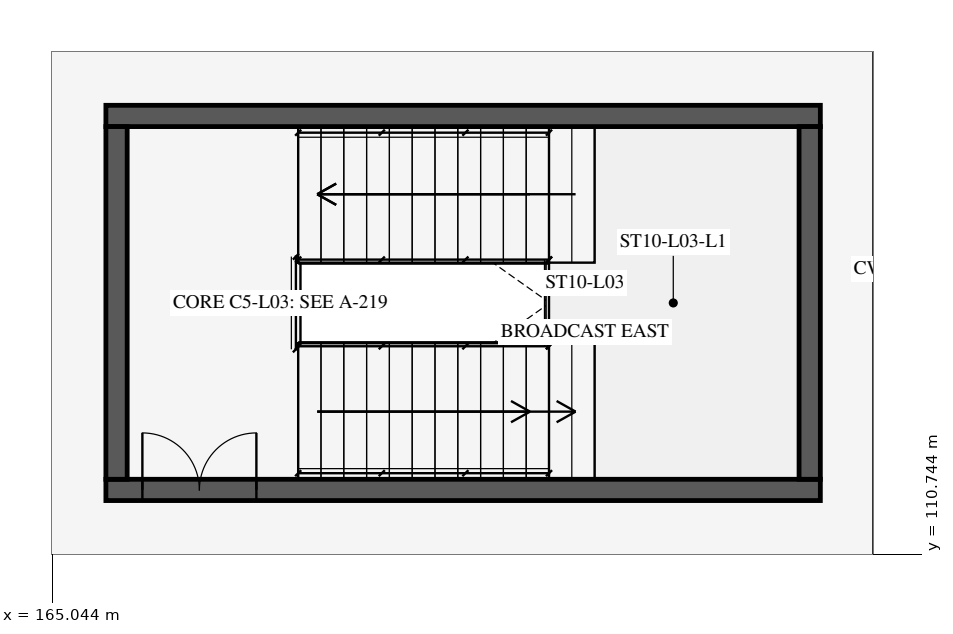
"""IFC4 building model, lengths in metres.
Left out: names, types, materials, properties, quantities, classifications, styles, units other than length and angle.
Written with IfcOpenShell. Run it as: python <this file> out.ifc"""

import sys

from ifc_helpers import new_model, si_unit, direction, frame, frame_2d, origin, place, context, subcontext, project, spatial, rectangle, extrude, element, fill, save


model = new_model("IFC4")
c1 = context("Model", 3, precision=1e-05, world=origin(), true_north=direction((0.0, 1.0)))
c2 = subcontext(c1, "Body", "Model", "MODEL_VIEW")
j1 = project(units=[si_unit("LENGTHUNIT", "METRE"), si_unit("PLANEANGLEUNIT", "RADIAN")], contexts=[c1])
p1 = place(None, origin())
s1 = spatial("IfcSite", under=j1, at=p1, CompositionType="ELEMENT")
p2 = place(p1, origin())
s2 = spatial("IfcBuilding", under=s1, at=p2, CompositionType="ELEMENT")
p3 = place(p2, frame((0.0, 0.0, 14.8)))
s3 = spatial("IfcBuildingStorey", under=s2, at=p3, CompositionType="ELEMENT", Elevation=14.8)
p4 = place(p3, frame((165.75, 111.59, 0.0), z_axis=(0.0, 0.0, 1.0), x_axis=(1.0, 0.0, 0.0)))
e1 = element("IfcWall", 1, at=p4, inside=s3, PredefinedType="SHEAR", context=c2, shape_type="SweptSolid", body=[
    extrude(rectangle(XDim=9.4, YDim=0.28, at=frame_2d((4.7, 0.0))), origin(), (0.0, 0.0, 1.0), 3.82),
])
p5 = place(p4, frame((0.48, 0.0, 0.0)))
e2 = element("IfcOpeningElement", 2, at=p5, cuts=e1, PredefinedType="OPENING", context=c2, shape_type="SweptSolid", body=[
    extrude(rectangle(XDim=1.5, YDim=2.3, at=frame_2d((0.75, 1.15))), frame((0.0, 0.152, 0.0), z_axis=(0.0, -1.0, 0.0), x_axis=(1.0, 0.0, 0.0)), (0.0, 0.0, 1.0), 0.304),
])
p6 = place(p3, frame((165.75, 116.51, 0.0), z_axis=(0.0, 0.0, 1.0), x_axis=(1.0, 0.0, 0.0)))
e3 = element("IfcWall", 3, at=p6, inside=s3, PredefinedType="SHEAR", context=c2, shape_type="SweptSolid", body=[
    extrude(rectangle(XDim=9.4, YDim=0.28, at=frame_2d((4.7, 0.0))), origin(), (0.0, 0.0, 1.0), 3.82),
])
for number, where, z_axis, x_axis in (
    (4, (165.89, 111.73, 0.0), (0.0, 0.0, 1.0), (0.0, 1.0, 0.0)),
    (5, (175.01, 111.73, 0.0), (0.0, 0.0, 1.0), (0.0, 1.0, 0.0)),
):
    element("IfcWall", number, at=place(p3, frame(where, z_axis=z_axis, x_axis=x_axis)), inside=s3, PredefinedType="SHEAR", context=c2, shape_type="SweptSolid", body=[
        extrude(rectangle(XDim=4.64, YDim=0.28, at=frame_2d((2.32, 0.0))), origin(), (0.0, 0.0, 1.0), 3.82),
    ])
p7 = place(p5, origin())
e6 = element("IfcDoor", 6, at=p7, inside=s3, OperationType="DOUBLE_DOOR_SINGLE_SWING", PredefinedType="DOOR", context=c2, shape_type="SweptSolid", body=[
    extrude(rectangle(XDim=1.5, YDim=2.3, at=frame_2d((0.75, 1.15))), frame((0.0, 0.025, 0.0), z_axis=(0.0, -1.0, 0.0), x_axis=(1.0, 0.0, 0.0)), (0.0, 0.0, 1.0), 0.05),
])
fill(e2, e6)
save(model, sys.argv[1])
